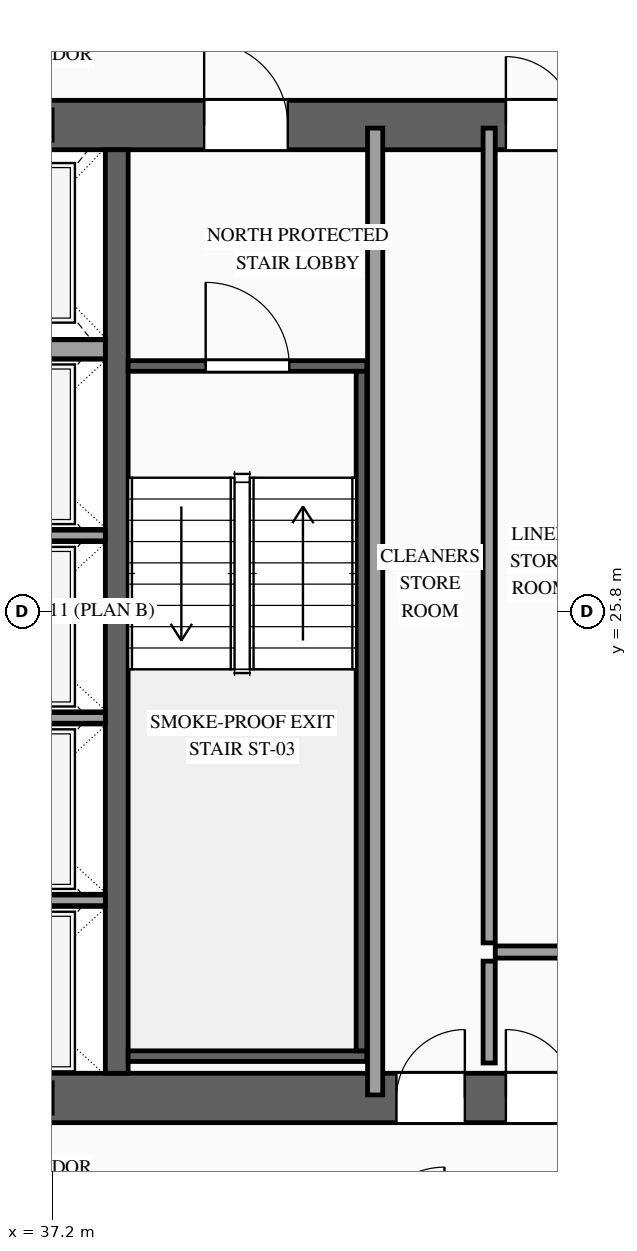
"""IFC4 building model, lengths in metres.
Left out: names, types, materials, properties, quantities, classifications, styles, units other than length and angle.
Written with IfcOpenShell. Run it as: python <this file> out.ifc"""

import sys

from ifc_helpers import new_model, si_unit, direction, frame, frame_2d, origin, place, context, subcontext, project, spatial, rectangle, extrude, source, transform, mapped, element, fill, save


model = new_model("IFC4")
c1 = context("Model", 3, precision=1e-05, world=origin(), true_north=direction((0.0, 1.0)))
c2 = subcontext(c1, "Body", "Model", "MODEL_VIEW")
j1 = project(units=[si_unit("LENGTHUNIT", "METRE"), si_unit("PLANEANGLEUNIT", "RADIAN")], contexts=[c1])
p1 = place(None, origin())
s1 = spatial("IfcSite", under=j1, at=p1, CompositionType="ELEMENT")
p2 = place(p1, origin())
s2 = spatial("IfcBuilding", under=s1, at=p2, CompositionType="ELEMENT")
p3 = place(p2, frame((0.0, 0.0, 188.0)))
s3 = spatial("IfcBuildingStorey", under=s2, at=p3, CompositionType="ELEMENT", Elevation=188.0)
p4 = place(p3, frame((23.475, 19.4, 0.0), z_axis=(0.0, 0.0, 1.0), x_axis=(1.0, 0.0, 0.0)))
e1 = element("IfcWall", 1, at=p4, inside=s3, PredefinedType="SHEAR", context=c2, shape_type="SweptSolid", body=[
    extrude(rectangle(XDim=27.05, YDim=0.65, at=frame_2d((13.525, 0.0))), origin(), (0.0, 0.0, 1.0), 3.5),
])
p5 = place(p4, frame((1.975, 0.0, 0.0)))
e2 = element("IfcOpeningElement", 2, at=p5, cuts=e1, PredefinedType="OPENING", context=c2, shape_type="SweptSolid", body=[
    extrude(rectangle(XDim=1.1, YDim=2.2, at=frame_2d((0.55, 1.1))), frame((0.0, 0.34, 0.0), z_axis=(0.0, -1.0, 0.0), x_axis=(1.0, 0.0, 0.0)), (0.0, 0.0, 1.0), 0.68),
])
p6 = place(p4, frame((9.875, 0.0, 0.0)))
e3 = element("IfcOpeningElement", 3, at=p6, cuts=e1, PredefinedType="OPENING", context=c2, shape_type="SweptSolid", body=[
    extrude(rectangle(XDim=1.1, YDim=2.2, at=frame_2d((0.55, 1.1))), frame((0.0, 0.34, 0.0), z_axis=(0.0, -1.0, 0.0), x_axis=(1.0, 0.0, 0.0)), (0.0, 0.0, 1.0), 0.68),
])
p7 = place(p4, frame((23.075, 0.0, 0.0)))
e4 = element("IfcOpeningElement", 4, at=p7, cuts=e1, PredefinedType="OPENING", context=c2, shape_type="SweptSolid", body=[
    extrude(rectangle(XDim=1.1, YDim=2.2, at=frame_2d((0.55, 1.1))), frame((0.0, 0.34, 0.0), z_axis=(0.0, -1.0, 0.0), x_axis=(1.0, 0.0, 0.0)), (0.0, 0.0, 1.0), 0.68),
])
p8 = place(p4, frame((19.695, 0.0, 0.0)))
e5 = element("IfcOpeningElement", 5, at=p8, cuts=e1, PredefinedType="OPENING", context=c2, shape_type="SweptSolid", body=[
    extrude(rectangle(XDim=0.9, YDim=2.15, at=frame_2d((0.45, 1.075))), frame((0.0, 0.34, 0.0), z_axis=(0.0, -1.0, 0.0), x_axis=(1.0, 0.0, 0.0)), (0.0, 0.0, 1.0), 0.68),
])
p9 = place(p4, frame((18.255, 0.0, 0.0)))
e6 = element("IfcOpeningElement", 6, at=p9, cuts=e1, PredefinedType="OPENING", context=c2, shape_type="SweptSolid", body=[
    extrude(rectangle(XDim=0.9, YDim=2.15, at=frame_2d((0.45, 1.075))), frame((0.0, 0.34, 0.0), z_axis=(0.0, -1.0, 0.0), x_axis=(1.0, 0.0, 0.0)), (0.0, 0.0, 1.0), 0.68),
])
p10 = place(p3, frame((23.475, 32.2, 0.0), z_axis=(0.0, 0.0, 1.0), x_axis=(1.0, 0.0, 0.0)))
e7 = element("IfcWall", 7, at=p10, inside=s3, PredefinedType="SHEAR", context=c2, shape_type="SweptSolid", body=[
    extrude(rectangle(XDim=27.05, YDim=0.65, at=frame_2d((13.525, 0.0))), origin(), (0.0, 0.0, 1.0), 3.5),
])
p11 = place(p10, frame((4.595, 0.0, 0.0)))
e8 = element("IfcOpeningElement", 8, at=p11, cuts=e7, PredefinedType="OPENING", context=c2, shape_type="SweptSolid", body=[
    extrude(rectangle(XDim=0.9, YDim=2.15, at=frame_2d((0.45, 1.075))), frame((0.0, 0.34, 0.0), z_axis=(0.0, -1.0, 0.0), x_axis=(1.0, 0.0, 0.0)), (0.0, 0.0, 1.0), 0.68),
])
p12 = place(p10, frame((9.875, 0.0, 0.0)))
e9 = element("IfcOpeningElement", 9, at=p12, cuts=e7, PredefinedType="OPENING", context=c2, shape_type="SweptSolid", body=[
    extrude(rectangle(XDim=1.1, YDim=2.2, at=frame_2d((0.55, 1.1))), frame((0.0, 0.34, 0.0), z_axis=(0.0, -1.0, 0.0), x_axis=(1.0, 0.0, 0.0)), (0.0, 0.0, 1.0), 0.68),
])
p13 = place(p10, frame((15.725, 0.0, 0.0)))
e10 = element("IfcOpeningElement", 10, at=p13, cuts=e7, PredefinedType="OPENING", context=c2, shape_type="SweptSolid", body=[
    extrude(rectangle(XDim=1.1, YDim=2.2, at=frame_2d((0.55, 1.1))), frame((0.0, 0.34, 0.0), z_axis=(0.0, -1.0, 0.0), x_axis=(1.0, 0.0, 0.0)), (0.0, 0.0, 1.0), 0.68),
])
p14 = place(p10, frame((19.695, 0.0, 0.0)))
e11 = element("IfcOpeningElement", 11, at=p14, cuts=e7, PredefinedType="OPENING", context=c2, shape_type="SweptSolid", body=[
    extrude(rectangle(XDim=0.9, YDim=2.15, at=frame_2d((0.45, 1.075))), frame((0.0, 0.34, 0.0), z_axis=(0.0, -1.0, 0.0), x_axis=(1.0, 0.0, 0.0)), (0.0, 0.0, 1.0), 0.68),
])
m1 = source(origin(), c2, "Body", "SweptSolid", [
    extrude(rectangle(XDim=12.15, YDim=0.3, at=frame_2d((6.075, 0.0))), origin(), (0.0, 0.0, 1.0), 3.5),
])
p15 = place(p3, frame((38.05, 19.725, 0.0), z_axis=(0.0, 0.0, 1.0), x_axis=(0.0, 1.0, 0.0)))
e12 = element("IfcWall", 12, at=p15, inside=s3, PredefinedType="SOLIDWALL", context=c2, shape_type="MappedRepresentation", body=[
    mapped(m1, transform((0.0, 0.0, 0.0), scale=1.0)),
])
m2 = source(origin(), c2, "Body", "SweptSolid", [
    extrude(rectangle(XDim=2.4, YDim=0.14, at=frame_2d((1.2, 0.0))), origin(), (0.0, 0.0, 1.0), 3.28),
])
for number, where, z_axis, x_axis in (
    (13, (35.5, 22.0, 0.0), (0.0, 0.0, 1.0), (1.0, 0.0, 0.0)),
    (14, (35.5, 24.4, 0.0), (0.0, 0.0, 1.0), (1.0, 0.0, 0.0)),
    (15, (35.5, 26.8, 0.0), (0.0, 0.0, 1.0), (1.0, 0.0, 0.0)),
):
    element("IfcWall", number, at=place(p3, frame(where, z_axis=z_axis, x_axis=x_axis)), inside=s3, PredefinedType="SOLIDWALL", context=c2, shape_type="MappedRepresentation", body=[
        mapped(m2, transform((0.0, 0.0, 0.0), scale=1.0)),
    ])
m3 = source(origin(), c2, "Body", "SweptSolid", [
    extrude(rectangle(XDim=2.4, YDim=0.25, at=frame_2d((1.2, 0.0))), origin(), (0.0, 0.0, 1.0), 3.28),
])
p16 = place(p3, frame((35.5, 29.25, 0.0), z_axis=(0.0, 0.0, 1.0), x_axis=(1.0, 0.0, 0.0)))
e16 = element("IfcWall", 16, at=p16, inside=s3, PredefinedType="SOLIDWALL", context=c2, shape_type="MappedRepresentation", body=[
    mapped(m3, transform((0.0, 0.0, 0.0), scale=1.0)),
])
p17 = place(p3, frame((38.2, 29.03, 0.0), z_axis=(0.0, 0.0, 1.0), x_axis=(1.0, 0.0, 0.0)))
e17 = element("IfcWall", 17, at=p17, inside=s3, PredefinedType="SOLIDWALL", context=c2, shape_type="SweptSolid", body=[
    extrude(rectangle(XDim=3.14, YDim=0.14, at=frame_2d((1.57, 0.0))), origin(), (0.0, 0.0, 1.0), 3.28),
])
p18 = place(p17, frame((1.02, 0.0, 0.0)))
e18 = element("IfcOpeningElement", 18, at=p18, cuts=e17, PredefinedType="OPENING", context=c2, shape_type="SweptSolid", body=[
    extrude(rectangle(XDim=1.1, YDim=2.2, at=frame_2d((0.55, 1.1))), frame((0.0, 0.085, 0.0), z_axis=(0.0, -1.0, 0.0), x_axis=(1.0, 0.0, 0.0)), (0.0, 0.0, 1.0), 0.17),
])
m4 = source(origin(), c2, "Body", "SweptSolid", [
    extrude(rectangle(XDim=3.14, YDim=0.14, at=frame_2d((1.57, 0.0))), origin(), (0.0, 0.0, 1.0), 3.28),
])
p19 = place(p3, frame((38.2, 19.95, 0.0), z_axis=(0.0, 0.0, 1.0), x_axis=(1.0, 0.0, 0.0)))
e19 = element("IfcWall", 19, at=p19, inside=s3, PredefinedType="SOLIDWALL", context=c2, shape_type="MappedRepresentation", body=[
    mapped(m4, transform((0.0, 0.0, 0.0), scale=1.0)),
])
m5 = source(origin(), c2, "Body", "SweptSolid", [
    extrude(rectangle(XDim=8.94, YDim=0.14, at=frame_2d((4.47, 0.0))), origin(), (0.0, 0.0, 1.0), 3.28),
])
p20 = place(p3, frame((41.27, 20.02, 0.0), z_axis=(0.0, 0.0, 1.0), x_axis=(0.0, 1.0, 0.0)))
e20 = element("IfcWall", 20, at=p20, inside=s3, PredefinedType="SOLIDWALL", context=c2, shape_type="MappedRepresentation", body=[
    mapped(m5, transform((0.0, 0.0, 0.0), scale=1.0)),
])
m6 = source(origin(), c2, "Body", "SweptSolid", [
    extrude(rectangle(XDim=1.34, YDim=0.16, at=frame_2d((0.67, 0.0))), origin(), (0.0, 0.0, 1.0), 3.28),
])
p21 = place(p3, frame((42.95, 19.86, 0.0), z_axis=(0.0, 0.0, 1.0), x_axis=(0.0, 1.0, 0.0)))
e21 = element("IfcWall", 21, at=p21, inside=s3, PredefinedType="PARTITIONING", context=c2, shape_type="MappedRepresentation", body=[
    mapped(m6, transform((0.0, 0.0, 0.0), scale=1.0)),
])
m7 = source(origin(), c2, "Body", "SweptSolid", [
    extrude(rectangle(XDim=1.17, YDim=0.16, at=frame_2d((0.585, 0.0))), origin(), (0.0, 0.0, 1.0), 3.28),
])
p22 = place(p3, frame((43.03, 21.32, 0.0), z_axis=(0.0, 0.0, 1.0), x_axis=(1.0, 0.0, 0.0)))
e22 = element("IfcWall", 22, at=p22, inside=s3, PredefinedType="PARTITIONING", context=c2, shape_type="MappedRepresentation", body=[
    mapped(m7, transform((0.0, 0.0, 0.0), scale=1.0)),
])
m8 = source(origin(), c2, "Body", "SweptSolid", [
    extrude(rectangle(XDim=12.72, YDim=0.2, at=frame_2d((6.36, 0.0))), origin(), (0.0, 0.0, 1.0), 3.28),
])
p23 = place(p3, frame((41.45, 19.44, 0.0), z_axis=(0.0, 0.0, 1.0), x_axis=(0.0, 1.0, 0.0)))
e23 = element("IfcWall", 23, at=p23, inside=s3, PredefinedType="PARTITIONING", context=c2, shape_type="MappedRepresentation", body=[
    mapped(m8, transform((0.0, 0.0, 0.0), scale=1.0)),
])
m9 = source(origin(), c2, "Body", "SweptSolid", [
    extrude(rectangle(XDim=10.72, YDim=0.16, at=frame_2d((5.36, 0.0))), origin(), (0.0, 0.0, 1.0), 3.28),
])
p24 = place(p3, frame((42.95, 21.44, 0.0), z_axis=(0.0, 0.0, 1.0), x_axis=(0.0, 1.0, 0.0)))
e24 = element("IfcWall", 24, at=p24, inside=s3, PredefinedType="PARTITIONING", context=c2, shape_type="MappedRepresentation", body=[
    mapped(m9, transform((0.0, 0.0, 0.0), scale=1.0)),
])
m10 = source(origin(), c2, "Body", "SweptSolid", [
    extrude(rectangle(XDim=1.1, YDim=2.2, at=frame_2d((0.55, 1.1))), frame((0.0, 0.025, 0.0), z_axis=(0.0, -1.0, 0.0), x_axis=(1.0, 0.0, 0.0)), (0.0, 0.0, 1.0), 0.05),
])
p25 = place(p18, origin())
e25 = element("IfcDoor", 25, at=p25, inside=s3, OperationType="SINGLE_SWING_LEFT", PredefinedType="DOOR", context=c2, shape_type="MappedRepresentation", body=[
    mapped(m10, transform((0.0, 0.0, 0.0), scale=1.0)),
])
fill(e18, e25)
p26 = place(p13, origin())
e26 = element("IfcDoor", 26, at=p26, inside=s3, OperationType="SINGLE_SWING_LEFT", PredefinedType="DOOR", context=c2, shape_type="MappedRepresentation", body=[
    mapped(m10, transform((0.0, 0.0, 0.0), scale=1.0)),
])
fill(e10, e26)
m11 = source(origin(), c2, "Body", "SweptSolid", [
    extrude(rectangle(XDim=0.9, YDim=2.15, at=frame_2d((0.45, 1.075))), frame((0.0, 0.025, 0.0), z_axis=(0.0, -1.0, 0.0), x_axis=(1.0, 0.0, 0.0)), (0.0, 0.0, 1.0), 0.05),
])
p27 = place(p8, origin())
e27 = element("IfcDoor", 27, at=p27, inside=s3, OperationType="SINGLE_SWING_LEFT", PredefinedType="DOOR", context=c2, shape_type="MappedRepresentation", body=[
    mapped(m11, transform((0.0, 0.0, 0.0), scale=1.0)),
])
fill(e5, e27)
p28 = place(p9, origin())
e28 = element("IfcDoor", 28, at=p28, inside=s3, OperationType="SINGLE_SWING_RIGHT", PredefinedType="DOOR", context=c2, shape_type="MappedRepresentation", body=[
    mapped(m11, transform((0.0, 0.0, 0.0), scale=1.0)),
])
fill(e6, e28)
p29 = place(p14, origin())
e29 = element("IfcDoor", 29, at=p29, inside=s3, OperationType="SINGLE_SWING_LEFT", PredefinedType="DOOR", context=c2, shape_type="MappedRepresentation", body=[
    mapped(m11, transform((0.0, 0.0, 0.0), scale=1.0)),
])
fill(e11, e29)
save(model, sys.argv[1])
